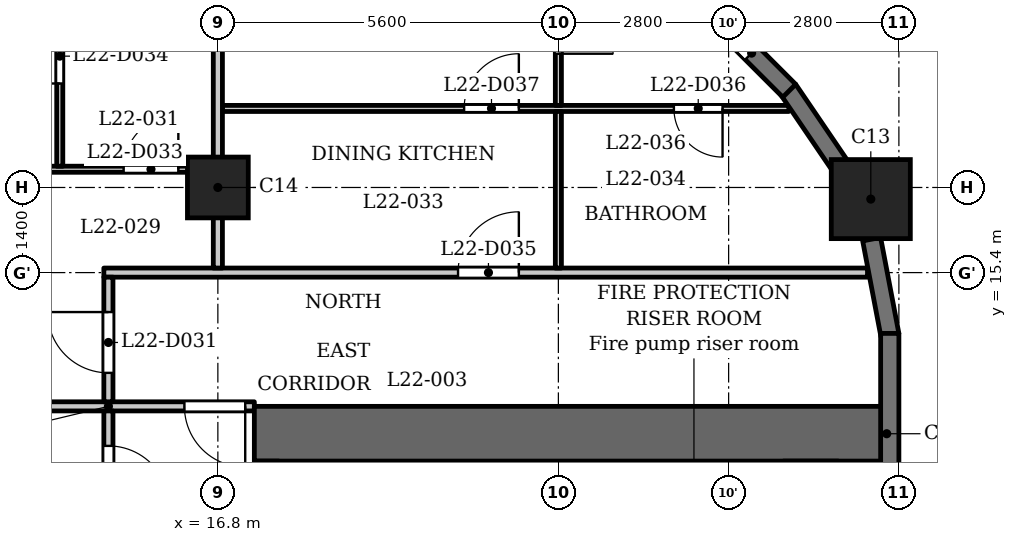
"""IFC4 building model, lengths in metres.
Left out: names, types, materials, properties, quantities, classifications, styles, units other than length and angle.
Written with IfcOpenShell. Run it as: python <this file> out.ifc"""

import sys

from ifc_helpers import new_model, si_unit, direction, frame, frame_2d, origin, origin_2d, place, context, subcontext, project, spatial, rectangle, extrude, element, fill, save


model = new_model("IFC4")
c1 = context("Model", 3, precision=1e-05, world=origin(), true_north=direction((0.0, 1.0)))
c2 = subcontext(c1, "Body", "Model", "MODEL_VIEW")
j1 = project(units=[si_unit("LENGTHUNIT", "METRE"), si_unit("PLANEANGLEUNIT", "RADIAN")], contexts=[c1])
p1 = place(None, origin())
s1 = spatial("IfcSite", under=j1, at=p1, CompositionType="ELEMENT")
p2 = place(p1, origin())
s2 = spatial("IfcBuilding", under=s1, at=p2, CompositionType="ELEMENT")
p3 = place(p2, frame((0.0, 0.0, 90.3)))
s3 = spatial("IfcBuildingStorey", under=s2, at=p3, CompositionType="ELEMENT", Elevation=90.3)
p4 = place(p3, frame((27.538, 16.609, 0.0), z_axis=(0.0, 0.0, 1.0), x_axis=(1.0, 0.0, 0.0)))
e1 = element("IfcColumn", 1, at=p4, inside=s3, PredefinedType="COLUMN", context=c2, shape_type="SweptSolid", body=[
    extrude(rectangle(XDim=1.3, YDim=1.3, at=origin_2d()), origin(), (0.0, 0.0, 1.0), 3.5),
])
p5 = place(p3, frame((16.8, 16.8, 0.0), z_axis=(0.0, 0.0, 1.0), x_axis=(1.0, 0.0, 0.0)))
e2 = element("IfcColumn", 2, at=p5, inside=s3, PredefinedType="COLUMN", context=c2, shape_type="SweptSolid", body=[
    extrude(rectangle(XDim=1.0, YDim=1.0, at=origin_2d()), origin(), (0.0, 0.0, 1.0), 3.5),
])
p6 = place(p3, frame((27.85, 11.85, 0.0), z_axis=(0.0, 0.0, 1.0), x_axis=(0.0, 1.0, 0.0)))
e3 = element("IfcWall", 3, at=p6, inside=s3, PredefinedType="SOLIDWALL", context=c2, shape_type="SweptSolid", body=[
    extrude(rectangle(XDim=2.55, YDim=0.3, at=frame_2d((1.275, 0.0))), origin(), (0.0, 0.0, 1.0), 2.4),
])
for number, where, z_axis, x_axis in (
    (4, (27.853, 14.372, 0.0), (0.0, 0.0, 1.0), (-0.187, 0.982, 0.0)),
    (5, (27.082, 17.084, 0.0), (0.0, 0.0, 1.0), (-0.562, 0.827, 0.0)),
):
    element("IfcWall", number, at=place(p3, frame(where, z_axis=z_axis, x_axis=x_axis)), inside=s3, PredefinedType="SOLIDWALL", context=c2, shape_type="SweptSolid", body=[
        extrude(rectangle(XDim=1.606, YDim=0.3, at=frame_2d((0.803, 0.0))), origin(), (0.0, 0.0, 1.0), 2.4),
    ])
p7 = place(p3, frame((26.197, 18.391, 0.0), z_axis=(0.0, 0.0, 1.0), x_axis=(-0.707058908279, 0.707154650853, 0.0)))
e6 = element("IfcWall", 6, at=p7, inside=s3, PredefinedType="SOLIDWALL", context=c2, shape_type="SweptSolid", body=[
    extrude(rectangle(XDim=2.55, YDim=0.3, at=frame_2d((1.275, 0.0))), origin(), (0.0, 0.0, 1.0), 2.4),
])
p8 = place(p7, frame((0.875, 0.0, 0.6)))
e7 = element("IfcOpeningElement", 7, at=p8, cuts=e6, PredefinedType="OPENING", context=c2, shape_type="SweptSolid", body=[
    extrude(rectangle(XDim=0.8, YDim=1.55, at=frame_2d((0.4, 0.775))), frame((0.0, 0.16, 0.0), z_axis=(0.0, -1.0, 0.0), x_axis=(1.0, 0.0, 0.0)), (0.0, 0.0, 1.0), 0.32),
])
p9 = place(p3, frame((17.4, 12.75, 0.0), z_axis=(0.0, 0.0, 1.0), x_axis=(1.0, 0.0, 0.0)))
e8 = element("IfcWall", 8, at=p9, inside=s3, PredefinedType="SHEAR", context=c2, shape_type="SweptSolid", body=[
    extrude(rectangle(XDim=10.4, YDim=0.9, at=frame_2d((5.2, 0.0))), origin(), (0.0, 0.0, 1.0), 3.2),
])
p10 = place(p3, frame((17.6, -12.3, 0.0), z_axis=(0.0, 0.0, 1.0), x_axis=(0.0, 1.0, 0.0)))
e9 = element("IfcWall", 9, at=p10, inside=s3, PredefinedType="SHEAR", context=c2, shape_type="SweptSolid", body=[
    extrude(rectangle(XDim=24.6, YDim=0.4, at=frame_2d((12.3, 0.0))), origin(), (0.0, 0.0, 1.0), 3.2),
])
p11 = place(p10, frame((6.0, 0.0, 0.0)))
e10 = element("IfcOpeningElement", 10, at=p11, cuts=e9, PredefinedType="OPENING", context=c2, shape_type="SweptSolid", body=[
    extrude(rectangle(XDim=1.1, YDim=2.1, at=frame_2d((0.55, 1.05))), frame((0.0, 0.21, 0.0), z_axis=(0.0, -1.0, 0.0), x_axis=(1.0, 0.0, 0.0)), (0.0, 0.0, 1.0), 0.42),
])
p12 = place(p10, frame((8.4, 0.0, 0.0)))
e11 = element("IfcOpeningElement", 11, at=p12, cuts=e9, PredefinedType="OPENING", context=c2, shape_type="SweptSolid", body=[
    extrude(rectangle(XDim=1.1, YDim=2.1, at=frame_2d((0.55, 1.05))), frame((0.0, 0.21, 0.0), z_axis=(0.0, -1.0, 0.0), x_axis=(1.0, 0.0, 0.0)), (0.0, 0.0, 1.0), 0.42),
])
p13 = place(p10, frame((10.8, 0.0, 0.0)))
e12 = element("IfcOpeningElement", 12, at=p13, cuts=e9, PredefinedType="OPENING", context=c2, shape_type="SweptSolid", body=[
    extrude(rectangle(XDim=1.1, YDim=2.1, at=frame_2d((0.55, 1.05))), frame((0.0, 0.21, 0.0), z_axis=(0.0, -1.0, 0.0), x_axis=(1.0, 0.0, 0.0)), (0.0, 0.0, 1.0), 0.42),
])
p14 = place(p10, frame((16.75, 0.0, 0.0)))
e13 = element("IfcOpeningElement", 13, at=p14, cuts=e9, PredefinedType="OPENING", context=c2, shape_type="SweptSolid", body=[
    extrude(rectangle(XDim=0.9, YDim=2.1, at=frame_2d((0.45, 1.05))), frame((0.0, 0.21, 0.0), z_axis=(0.0, -1.0, 0.0), x_axis=(1.0, 0.0, 0.0)), (0.0, 0.0, 1.0), 0.42),
])
p15 = place(p10, frame((22.8, 0.0, 0.0)))
e14 = element("IfcOpeningElement", 14, at=p15, cuts=e9, PredefinedType="OPENING", context=c2, shape_type="SweptSolid", body=[
    extrude(rectangle(XDim=1.1, YDim=2.1, at=frame_2d((0.55, 1.05))), frame((0.0, 0.21, 0.0), z_axis=(0.0, -1.0, 0.0), x_axis=(1.0, 0.0, 0.0)), (0.0, 0.0, 1.0), 0.42),
])
p16 = place(p10, frame((0.7, 0.0, 0.0)))
e15 = element("IfcOpeningElement", 15, at=p16, cuts=e9, PredefinedType="OPENING", context=c2, shape_type="SweptSolid", body=[
    extrude(rectangle(XDim=1.1, YDim=2.1, at=frame_2d((0.55, 1.05))), frame((0.0, 0.21, 0.0), z_axis=(0.0, -1.0, 0.0), x_axis=(1.0, 0.0, 0.0)), (0.0, 0.0, 1.0), 0.42),
])
p17 = place(p10, frame((12.775, 0.0, 0.0)))
e16 = element("IfcOpeningElement", 16, at=p17, cuts=e9, PredefinedType="OPENING", context=c2, shape_type="SweptSolid", body=[
    extrude(rectangle(XDim=1.8, YDim=2.1, at=frame_2d((0.9, 1.05))), frame((0.0, 0.21, 0.0), z_axis=(0.0, -1.0, 0.0), x_axis=(1.0, 0.0, 0.0)), (0.0, 0.0, 1.0), 0.42),
])
p18 = place(p3, frame((26.55, -12.3, 0.0), z_axis=(0.0, 0.0, 1.0), x_axis=(0.0, 1.0, 0.0)))
e17 = element("IfcWall", 17, at=p18, inside=s3, PredefinedType="SHEAR", context=c2, shape_type="SweptSolid", body=[
    extrude(rectangle(XDim=24.6, YDim=0.9, at=frame_2d((12.3, 0.0))), origin(), (0.0, 0.0, 1.0), 3.2),
])
p19 = place(p3, frame((23.55, 9.8, 0.0), z_axis=(0.0, 0.0, 1.0), x_axis=(0.0, 1.0, 0.0)))
e18 = element("IfcWall", 18, at=p19, inside=s3, PredefinedType="PARTITIONING", context=c2, shape_type="SweptSolid", body=[
    extrude(rectangle(XDim=2.5, YDim=0.2, at=frame_2d((1.25, 0.0))), origin(), (0.0, 0.0, 1.0), 3.2),
])
p20 = place(p19, frame((0.8, 0.0, 0.0)))
e19 = element("IfcOpeningElement", 19, at=p20, cuts=e18, PredefinedType="OPENING", context=c2, shape_type="SweptSolid", body=[
    extrude(rectangle(XDim=0.9, YDim=2.1, at=frame_2d((0.45, 1.05))), frame((0.0, 0.11, 0.0), z_axis=(0.0, -1.0, 0.0), x_axis=(1.0, 0.0, 0.0)), (0.0, 0.0, 1.0), 0.22),
])
p21 = place(p3, frame((-17.4, 13.2, 0.0), z_axis=(0.0, 0.0, 1.0), x_axis=(1.0, 0.0, 0.0)))
e20 = element("IfcWall", 20, at=p21, inside=s3, PredefinedType="PARTITIONING", context=c2, shape_type="SweptSolid", body=[
    extrude(rectangle(XDim=34.8, YDim=0.15, at=frame_2d((17.4, 0.0))), origin(), (0.0, 0.0, 1.0), 3.2),
])
p22 = place(p21, frame((0.25, 0.0, 0.0)))
e21 = element("IfcOpeningElement", 21, at=p22, cuts=e20, PredefinedType="OPENING", context=c2, shape_type="SweptSolid", body=[
    extrude(rectangle(XDim=1.0, YDim=2.1, at=frame_2d((0.5, 1.05))), frame((0.0, 0.085, 0.0), z_axis=(0.0, -1.0, 0.0), x_axis=(1.0, 0.0, 0.0)), (0.0, 0.0, 1.0), 0.17),
])
p23 = place(p21, frame((33.65, 0.0, 0.0)))
e22 = element("IfcOpeningElement", 22, at=p23, cuts=e20, PredefinedType="OPENING", context=c2, shape_type="SweptSolid", body=[
    extrude(rectangle(XDim=1.0, YDim=2.1, at=frame_2d((0.5, 1.05))), frame((0.0, 0.085, 0.0), z_axis=(0.0, -1.0, 0.0), x_axis=(1.0, 0.0, 0.0)), (0.0, 0.0, 1.0), 0.17),
])
p24 = place(p21, frame((15.75, 0.0, 0.0)))
e23 = element("IfcOpeningElement", 23, at=p24, cuts=e20, PredefinedType="OPENING", context=c2, shape_type="SweptSolid", body=[
    extrude(rectangle(XDim=1.0, YDim=2.1, at=frame_2d((0.5, 1.05))), frame((0.0, 0.085, 0.0), z_axis=(0.0, -1.0, 0.0), x_axis=(1.0, 0.0, 0.0)), (0.0, 0.0, 1.0), 0.17),
])
p25 = place(p21, frame((21.35, 0.0, 0.0)))
e24 = element("IfcOpeningElement", 24, at=p25, cuts=e20, PredefinedType="OPENING", context=c2, shape_type="SweptSolid", body=[
    extrude(rectangle(XDim=1.0, YDim=2.1, at=frame_2d((0.5, 1.05))), frame((0.0, 0.085, 0.0), z_axis=(0.0, -1.0, 0.0), x_axis=(1.0, 0.0, 0.0)), (0.0, 0.0, 1.0), 0.17),
])
p26 = place(p3, frame((14.925, 15.4, 0.0), z_axis=(0.0, 0.0, 1.0), x_axis=(1.0, 0.0, 0.0)))
e25 = element("IfcWall", 25, at=p26, inside=s3, PredefinedType="PARTITIONING", context=c2, shape_type="SweptSolid", body=[
    extrude(rectangle(XDim=12.559, YDim=0.15, at=frame_2d((6.279, 0.0))), origin(), (0.0, 0.0, 1.0), 3.2),
])
p27 = place(p26, frame((5.825, 0.0, 0.0)))
e26 = element("IfcOpeningElement", 26, at=p27, cuts=e25, PredefinedType="OPENING", context=c2, shape_type="SweptSolid", body=[
    extrude(rectangle(XDim=1.0, YDim=2.1, at=frame_2d((0.5, 1.05))), frame((0.0, 0.085, 0.0), z_axis=(0.0, -1.0, 0.0), x_axis=(1.0, 0.0, 0.0)), (0.0, 0.0, 1.0), 0.17),
])
p28 = place(p3, frame((-16.725, 17.1, 0.0), z_axis=(0.0, 0.0, 1.0), x_axis=(1.0, 0.0, 0.0)))
e27 = element("IfcWall", 27, at=p28, inside=s3, PredefinedType="PARTITIONING", context=c2, shape_type="SweptSolid", body=[
    extrude(rectangle(XDim=33.45, YDim=0.1, at=frame_2d((16.725, 0.0))), origin(), (0.0, 0.0, 1.0), 3.2),
])
p29 = place(p28, frame((3.925, 0.0, 0.0)))
e28 = element("IfcOpeningElement", 28, at=p29, cuts=e27, PredefinedType="OPENING", context=c2, shape_type="SweptSolid", body=[
    extrude(rectangle(XDim=0.8, YDim=2.1, at=frame_2d((0.4, 1.05))), frame((0.0, 0.06, 0.0), z_axis=(0.0, -1.0, 0.0), x_axis=(1.0, 0.0, 0.0)), (0.0, 0.0, 1.0), 0.12),
])
p30 = place(p28, frame((0.975, 0.0, 0.0)))
e29 = element("IfcOpeningElement", 29, at=p30, cuts=e27, PredefinedType="OPENING", context=c2, shape_type="SweptSolid", body=[
    extrude(rectangle(XDim=0.9, YDim=2.1, at=frame_2d((0.45, 1.05))), frame((0.0, 0.06, 0.0), z_axis=(0.0, -1.0, 0.0), x_axis=(1.0, 0.0, 0.0)), (0.0, 0.0, 1.0), 0.12),
])
p31 = place(p28, frame((6.425, 0.0, 0.0)))
e30 = element("IfcOpeningElement", 30, at=p31, cuts=e27, PredefinedType="OPENING", context=c2, shape_type="SweptSolid", body=[
    extrude(rectangle(XDim=0.8, YDim=2.1, at=frame_2d((0.4, 1.05))), frame((0.0, 0.06, 0.0), z_axis=(0.0, -1.0, 0.0), x_axis=(1.0, 0.0, 0.0)), (0.0, 0.0, 1.0), 0.12),
])
p32 = place(p28, frame((8.825, 0.0, 0.0)))
e31 = element("IfcOpeningElement", 31, at=p32, cuts=e27, PredefinedType="OPENING", context=c2, shape_type="SweptSolid", body=[
    extrude(rectangle(XDim=0.9, YDim=2.1, at=frame_2d((0.45, 1.05))), frame((0.0, 0.06, 0.0), z_axis=(0.0, -1.0, 0.0), x_axis=(1.0, 0.0, 0.0)), (0.0, 0.0, 1.0), 0.12),
])
p33 = place(p28, frame((12.375, 0.0, 0.0)))
e32 = element("IfcOpeningElement", 32, at=p33, cuts=e27, PredefinedType="OPENING", context=c2, shape_type="SweptSolid", body=[
    extrude(rectangle(XDim=0.9, YDim=2.1, at=frame_2d((0.45, 1.05))), frame((0.0, 0.06, 0.0), z_axis=(0.0, -1.0, 0.0), x_axis=(1.0, 0.0, 0.0)), (0.0, 0.0, 1.0), 0.12),
])
p34 = place(p28, frame((14.425, 0.0, 0.0)))
e33 = element("IfcOpeningElement", 33, at=p34, cuts=e27, PredefinedType="OPENING", context=c2, shape_type="SweptSolid", body=[
    extrude(rectangle(XDim=0.9, YDim=2.1, at=frame_2d((0.45, 1.05))), frame((0.0, 0.06, 0.0), z_axis=(0.0, -1.0, 0.0), x_axis=(1.0, 0.0, 0.0)), (0.0, 0.0, 1.0), 0.12),
])
p35 = place(p28, frame((26.225, 0.0, 0.0)))
e34 = element("IfcOpeningElement", 34, at=p35, cuts=e27, PredefinedType="OPENING", context=c2, shape_type="SweptSolid", body=[
    extrude(rectangle(XDim=0.8, YDim=2.1, at=frame_2d((0.4, 1.05))), frame((0.0, 0.06, 0.0), z_axis=(0.0, -1.0, 0.0), x_axis=(1.0, 0.0, 0.0)), (0.0, 0.0, 1.0), 0.12),
])
p36 = place(p28, frame((23.025, 0.0, 0.0)))
e35 = element("IfcOpeningElement", 35, at=p36, cuts=e27, PredefinedType="OPENING", context=c2, shape_type="SweptSolid", body=[
    extrude(rectangle(XDim=0.9, YDim=2.1, at=frame_2d((0.45, 1.05))), frame((0.0, 0.06, 0.0), z_axis=(0.0, -1.0, 0.0), x_axis=(1.0, 0.0, 0.0)), (0.0, 0.0, 1.0), 0.12),
])
p37 = place(p28, frame((17.775, 0.0, 0.0)))
e36 = element("IfcOpeningElement", 36, at=p37, cuts=e27, PredefinedType="OPENING", context=c2, shape_type="SweptSolid", body=[
    extrude(rectangle(XDim=0.9, YDim=2.1, at=frame_2d((0.45, 1.05))), frame((0.0, 0.06, 0.0), z_axis=(0.0, -1.0, 0.0), x_axis=(1.0, 0.0, 0.0)), (0.0, 0.0, 1.0), 0.12),
])
p38 = place(p28, frame((20.025, 0.0, 0.0)))
e37 = element("IfcOpeningElement", 37, at=p38, cuts=e27, PredefinedType="OPENING", context=c2, shape_type="SweptSolid", body=[
    extrude(rectangle(XDim=0.9, YDim=2.1, at=frame_2d((0.45, 1.05))), frame((0.0, 0.06, 0.0), z_axis=(0.0, -1.0, 0.0), x_axis=(1.0, 0.0, 0.0)), (0.0, 0.0, 1.0), 0.12),
])
p39 = place(p28, frame((28.825, 0.0, 0.0)))
e38 = element("IfcOpeningElement", 38, at=p39, cuts=e27, PredefinedType="OPENING", context=c2, shape_type="SweptSolid", body=[
    extrude(rectangle(XDim=0.8, YDim=2.1, at=frame_2d((0.4, 1.05))), frame((0.0, 0.06, 0.0), z_axis=(0.0, -1.0, 0.0), x_axis=(1.0, 0.0, 0.0)), (0.0, 0.0, 1.0), 0.12),
])
p40 = place(p28, frame((31.975, 0.0, 0.0)))
e39 = element("IfcOpeningElement", 39, at=p40, cuts=e27, PredefinedType="OPENING", context=c2, shape_type="SweptSolid", body=[
    extrude(rectangle(XDim=0.9, YDim=2.1, at=frame_2d((0.45, 1.05))), frame((0.0, 0.06, 0.0), z_axis=(0.0, -1.0, 0.0), x_axis=(1.0, 0.0, 0.0)), (0.0, 0.0, 1.0), 0.12),
])
p41 = place(p3, frame((16.875, 18.1, 0.0), z_axis=(0.0, 0.0, 1.0), x_axis=(1.0, 0.0, 0.0)))
e40 = element("IfcWall", 40, at=p41, inside=s3, PredefinedType="PARTITIONING", context=c2, shape_type="SweptSolid", body=[
    extrude(rectangle(XDim=9.315, YDim=0.1, at=frame_2d((4.658, 0.0))), origin(), (0.0, 0.0, 1.0), 3.2),
])
p42 = place(p41, frame((7.425, 0.0, 0.0)))
e41 = element("IfcOpeningElement", 41, at=p42, cuts=e40, PredefinedType="OPENING", context=c2, shape_type="SweptSolid", body=[
    extrude(rectangle(XDim=0.8, YDim=2.1, at=frame_2d((0.4, 1.05))), frame((0.0, 0.06, 0.0), z_axis=(0.0, -1.0, 0.0), x_axis=(1.0, 0.0, 0.0)), (0.0, 0.0, 1.0), 0.12),
])
p43 = place(p41, frame((3.975, 0.0, 0.0)))
e42 = element("IfcOpeningElement", 42, at=p43, cuts=e40, PredefinedType="OPENING", context=c2, shape_type="SweptSolid", body=[
    extrude(rectangle(XDim=0.9, YDim=2.1, at=frame_2d((0.45, 1.05))), frame((0.0, 0.06, 0.0), z_axis=(0.0, -1.0, 0.0), x_axis=(1.0, 0.0, 0.0)), (0.0, 0.0, 1.0), 0.12),
])
p44 = place(p3, frame((14.2, 17.15, 0.0), z_axis=(0.0, 0.0, 1.0), x_axis=(0.0, 1.0, 0.0)))
e43 = element("IfcWall", 43, at=p44, inside=s3, PredefinedType="PARTITIONING", context=c2, shape_type="SweptSolid", body=[
    extrude(rectangle(XDim=4.93, YDim=0.1, at=frame_2d((2.465, 0.0))), origin(), (0.0, 0.0, 1.0), 3.2),
])
p45 = place(p44, frame((1.36, 0.0, 0.0)))
e44 = element("IfcOpeningElement", 44, at=p45, cuts=e43, PredefinedType="OPENING", context=c2, shape_type="SweptSolid", body=[
    extrude(rectangle(XDim=0.9, YDim=2.1, at=frame_2d((0.45, 1.05))), frame((0.0, 0.06, 0.0), z_axis=(0.0, -1.0, 0.0), x_axis=(1.0, 0.0, 0.0)), (0.0, 0.0, 1.0), 0.12),
])
p46 = place(p3, frame((15.0, 6.769, 0.0), z_axis=(0.0, 0.0, 1.0), x_axis=(0.0, 1.0, 0.0)))
e45 = element("IfcWall", 45, at=p46, inside=s3, PredefinedType="PARTITIONING", context=c2, shape_type="SweptSolid", body=[
    extrude(rectangle(XDim=6.356, YDim=0.15, at=frame_2d((3.178, 0.0))), origin(), (0.0, 0.0, 1.0), 3.2),
])
p47 = place(p46, frame((4.781, 0.0, 0.0)))
e46 = element("IfcOpeningElement", 46, at=p47, cuts=e45, PredefinedType="OPENING", context=c2, shape_type="SweptSolid", body=[
    extrude(rectangle(XDim=1.0, YDim=2.1, at=frame_2d((0.5, 1.05))), frame((0.0, 0.085, 0.0), z_axis=(0.0, -1.0, 0.0), x_axis=(1.0, 0.0, 0.0)), (0.0, 0.0, 1.0), 0.17),
])
p48 = place(p3, frame((15.0, 13.275, 0.0), z_axis=(0.0, 0.0, 1.0), x_axis=(0.0, 1.0, 0.0)))
e47 = element("IfcWall", 47, at=p48, inside=s3, PredefinedType="PARTITIONING", context=c2, shape_type="SweptSolid", body=[
    extrude(rectangle(XDim=2.05, YDim=0.15, at=frame_2d((1.025, 0.0))), origin(), (0.0, 0.0, 1.0), 3.2),
])
p49 = place(p48, frame((0.476, 0.0, 0.0)))
e48 = element("IfcOpeningElement", 48, at=p49, cuts=e47, PredefinedType="OPENING", context=c2, shape_type="SweptSolid", body=[
    extrude(rectangle(XDim=1.0, YDim=2.1, at=frame_2d((0.5, 1.05))), frame((0.0, 0.085, 0.0), z_axis=(0.0, -1.0, 0.0), x_axis=(1.0, 0.0, 0.0)), (0.0, 0.0, 1.0), 0.17),
])
p50 = place(p3, frame((16.8, 15.475, 0.0), z_axis=(0.0, 0.0, 1.0), x_axis=(0.0, 1.0, 0.0)))
e49 = element("IfcWall", 49, at=p50, inside=s3, PredefinedType="PARTITIONING", context=c2, shape_type="SweptSolid", body=[
    extrude(rectangle(XDim=7.555, YDim=0.15, at=frame_2d((3.777, 0.0))), origin(), (0.0, 0.0, 1.0), 3.2),
])
p51 = place(p3, frame((22.4, 15.475, 0.0), z_axis=(0.0, 0.0, 1.0), x_axis=(0.0, 1.0, 0.0)))
e50 = element("IfcWall", 50, at=p51, inside=s3, PredefinedType="PARTITIONING", context=c2, shape_type="SweptSolid", body=[
    extrude(rectangle(XDim=2.575, YDim=0.1, at=frame_2d((1.288, 0.0))), origin(), (0.0, 0.0, 1.0), 3.2),
])
p52 = place(p3, frame((22.4, 18.15, 0.0), z_axis=(0.0, 0.0, 1.0), x_axis=(0.0, 1.0, 0.0)))
e51 = element("IfcWall", 51, at=p52, inside=s3, PredefinedType="PARTITIONING", context=c2, shape_type="SweptSolid", body=[
    extrude(rectangle(XDim=3.57, YDim=0.1, at=frame_2d((1.785, 0.0))), origin(), (0.0, 0.0, 1.0), 3.2),
])
p53 = place(p52, frame((0.85, 0.0, 0.0)))
e52 = element("IfcOpeningElement", 52, at=p53, cuts=e51, PredefinedType="OPENING", context=c2, shape_type="SweptSolid", body=[
    extrude(rectangle(XDim=0.9, YDim=2.1, at=frame_2d((0.45, 1.05))), frame((0.0, 0.06, 0.0), z_axis=(0.0, -1.0, 0.0), x_axis=(1.0, 0.0, 0.0)), (0.0, 0.0, 1.0), 0.12),
])
p54 = place(p47, origin())
e53 = element("IfcDoor", 53, at=p54, inside=s3, OperationType="SINGLE_SWING_LEFT", PredefinedType="DOOR", context=c2, shape_type="SweptSolid", body=[
    extrude(rectangle(XDim=1.0, YDim=2.1, at=frame_2d((0.5, 1.05))), frame((0.0, 0.025, 0.0), z_axis=(0.0, -1.0, 0.0), x_axis=(1.0, 0.0, 0.0)), (0.0, 0.0, 1.0), 0.05),
])
fill(e46, e53)
p55 = place(p23, origin())
e54 = element("IfcDoor", 54, at=p55, inside=s3, OperationType="SINGLE_SWING_RIGHT", PredefinedType="DOOR", context=c2, shape_type="SweptSolid", body=[
    extrude(rectangle(XDim=1.0, YDim=2.1, at=frame_2d((0.5, 1.05))), frame((0.0, 0.025, 0.0), z_axis=(0.0, -1.0, 0.0), x_axis=(1.0, 0.0, 0.0)), (0.0, 0.0, 1.0), 0.05),
])
fill(e22, e54)
p56 = place(p49, origin())
e55 = element("IfcDoor", 55, at=p56, inside=s3, OperationType="SINGLE_SWING_LEFT", PredefinedType="DOOR", context=c2, shape_type="SweptSolid", body=[
    extrude(rectangle(XDim=1.0, YDim=2.1, at=frame_2d((0.5, 1.05))), frame((0.0, 0.025, 0.0), z_axis=(0.0, -1.0, 0.0), x_axis=(1.0, 0.0, 0.0)), (0.0, 0.0, 1.0), 0.05),
])
fill(e48, e55)
p57 = place(p40, origin())
e56 = element("IfcDoor", 56, at=p57, inside=s3, OperationType="SINGLE_SWING_LEFT", PredefinedType="DOOR", context=c2, shape_type="SweptSolid", body=[
    extrude(rectangle(XDim=0.9, YDim=2.1, at=frame_2d((0.45, 1.05))), frame((0.0, 0.025, 0.0), z_axis=(0.0, -1.0, 0.0), x_axis=(1.0, 0.0, 0.0)), (0.0, 0.0, 1.0), 0.05),
])
fill(e39, e56)
p58 = place(p45, origin())
e57 = element("IfcDoor", 57, at=p58, inside=s3, OperationType="SINGLE_SWING_RIGHT", PredefinedType="DOOR", context=c2, shape_type="SweptSolid", body=[
    extrude(rectangle(XDim=0.9, YDim=2.1, at=frame_2d((0.45, 1.05))), frame((0.0, 0.025, 0.0), z_axis=(0.0, -1.0, 0.0), x_axis=(1.0, 0.0, 0.0)), (0.0, 0.0, 1.0), 0.05),
])
fill(e44, e57)
p59 = place(p27, origin())
e58 = element("IfcDoor", 58, at=p59, inside=s3, OperationType="SINGLE_SWING_LEFT", PredefinedType="DOOR", context=c2, shape_type="SweptSolid", body=[
    extrude(rectangle(XDim=1.0, YDim=2.1, at=frame_2d((0.5, 1.05))), frame((0.0, 0.025, 0.0), z_axis=(0.0, -1.0, 0.0), x_axis=(1.0, 0.0, 0.0)), (0.0, 0.0, 1.0), 0.05),
])
fill(e26, e58)
p60 = place(p42, origin())
e59 = element("IfcDoor", 59, at=p60, inside=s3, OperationType="SINGLE_SWING_RIGHT", PredefinedType="DOOR", context=c2, shape_type="SweptSolid", body=[
    extrude(rectangle(XDim=0.8, YDim=2.1, at=frame_2d((0.4, 1.05))), frame((0.0, 0.025, 0.0), z_axis=(0.0, -1.0, 0.0), x_axis=(1.0, 0.0, 0.0)), (0.0, 0.0, 1.0), 0.05),
])
fill(e41, e59)
p61 = place(p43, origin())
e60 = element("IfcDoor", 60, at=p61, inside=s3, OperationType="SINGLE_SWING_LEFT", PredefinedType="DOOR", context=c2, shape_type="SweptSolid", body=[
    extrude(rectangle(XDim=0.9, YDim=2.1, at=frame_2d((0.45, 1.05))), frame((0.0, 0.025, 0.0), z_axis=(0.0, -1.0, 0.0), x_axis=(1.0, 0.0, 0.0)), (0.0, 0.0, 1.0), 0.05),
])
fill(e42, e60)
p62 = place(p53, origin())
e61 = element("IfcDoor", 61, at=p62, inside=s3, OperationType="SINGLE_SWING_LEFT", PredefinedType="DOOR", context=c2, shape_type="SweptSolid", body=[
    extrude(rectangle(XDim=0.9, YDim=2.1, at=frame_2d((0.45, 1.05))), frame((0.0, 0.025, 0.0), z_axis=(0.0, -1.0, 0.0), x_axis=(1.0, 0.0, 0.0)), (0.0, 0.0, 1.0), 0.05),
])
fill(e52, e61)
p63 = place(p8, origin())
e62 = element("IfcWindow", 62, at=p63, inside=s3, PartitioningType="SINGLE_PANEL", PredefinedType="WINDOW", context=c2, shape_type="SweptSolid", body=[
    extrude(rectangle(XDim=0.8, YDim=1.55, at=frame_2d((0.4, 0.775))), frame((0.0, 0.03, 0.0), z_axis=(0.0, -1.0, 0.0), x_axis=(1.0, 0.0, 0.0)), (0.0, 0.0, 1.0), 0.06),
])
fill(e7, e62)
save(model, sys.argv[1])
